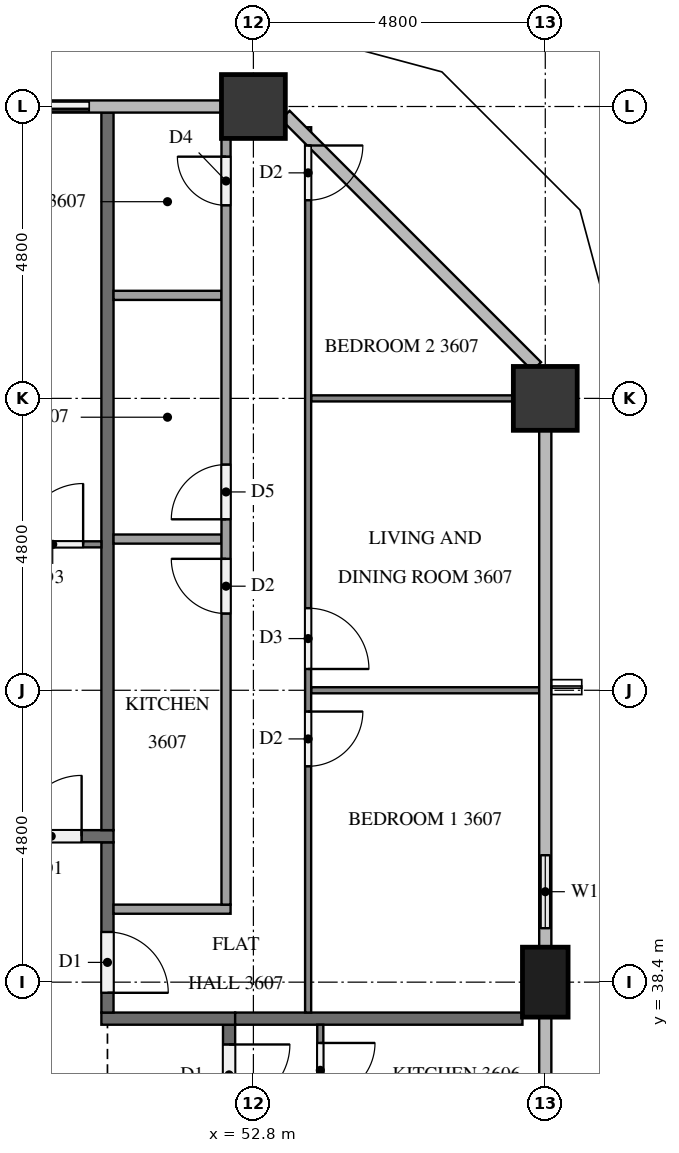
"""IFC4 building model, lengths in metres.
Left out: names, types, materials, properties, quantities, classifications, styles, units other than length and angle.
Written with IfcOpenShell. Run it as: python <this file> out.ifc"""

import sys

from ifc_helpers import new_model, si_unit, direction, frame, frame_2d, origin, origin_2d, place, context, subcontext, project, spatial, rectangle, extrude, element, fill, save


model = new_model("IFC4")
c1 = context("Model", 3, precision=1e-05, world=origin(), true_north=direction((0.0, 1.0)))
c2 = subcontext(c1, "Body", "Model", "MODEL_VIEW")
j1 = project(units=[si_unit("LENGTHUNIT", "METRE"), si_unit("PLANEANGLEUNIT", "RADIAN")], contexts=[c1])
p1 = place(None, origin())
s1 = spatial("IfcSite", under=j1, at=p1, CompositionType="ELEMENT")
p2 = place(p1, origin())
s2 = spatial("IfcBuilding", under=s1, at=p2, CompositionType="ELEMENT")
p3 = place(p2, frame((0.0, 0.0, 140.1)))
s3 = spatial("IfcBuildingStorey", under=s2, at=p3, CompositionType="ELEMENT", Elevation=140.1)
p4 = place(p3, frame((57.6, 38.4, 0.0), z_axis=(0.0, 0.0, 1.0), x_axis=(0.0, 1.0, 0.0)))
e1 = element("IfcColumn", 1, at=p4, inside=s3, PredefinedType="COLUMN", context=c2, shape_type="SweptSolid", body=[
    extrude(rectangle(XDim=1.15, YDim=0.75, at=origin_2d()), origin(), (0.0, 0.0, 1.0), 3.1),
])
for number, where, z_axis, x_axis in (
    (2, (57.6, 48.0, 0.0), (0.0, 0.0, 1.0), (1.0, 0.0, 0.0)),
    (3, (52.8, 52.8, 0.0), (0.0, 0.0, 1.0), (1.0, 0.0, 0.0)),
):
    element("IfcColumn", number, at=place(p3, frame(where, z_axis=z_axis, x_axis=x_axis)), inside=s3, PredefinedType="COLUMN", context=c2, shape_type="SweptSolid", body=[
        extrude(rectangle(XDim=1.05, YDim=1.05, at=origin_2d()), origin(), (0.0, 0.0, 1.0), 3.1),
    ])
p5 = place(p3, frame((57.6, 38.975, 0.0), z_axis=(0.0, 0.0, 1.0), x_axis=(0.0, 1.0, 0.0)))
e4 = element("IfcWall", 4, at=p5, inside=s3, PredefinedType="SOLIDWALL", context=c2, shape_type="SweptSolid", body=[
    extrude(rectangle(XDim=1.825, YDim=0.15, at=frame_2d((0.913, 0.0))), origin(), (0.0, 0.0, 1.0), 3.1),
])
p6 = place(p5, frame((0.312, 0.0, 0.9)))
e5 = element("IfcOpeningElement", 5, at=p6, cuts=e4, PredefinedType="OPENING", context=c2, shape_type="SweptSolid", body=[
    extrude(rectangle(XDim=1.2, YDim=1.4, at=frame_2d((0.6, 0.7))), frame((0.0, 0.085, 0.0), z_axis=(0.0, -1.0, 0.0), x_axis=(1.0, 0.0, 0.0)), (0.0, 0.0, 1.0), 0.17),
])
p7 = place(p3, frame((50.4, 52.8, 0.0), z_axis=(0.0, 0.0, 1.0), x_axis=(-1.0, 0.0, 0.0)))
e6 = element("IfcWall", 6, at=p7, inside=s3, PredefinedType="SOLIDWALL", context=c2, shape_type="SweptSolid", body=[
    extrude(rectangle(XDim=2.4, YDim=0.15, at=frame_2d((1.2, 0.0))), origin(), (0.0, 0.0, 1.0), 3.1),
])
p8 = place(p7, frame((0.3, 0.0, 0.0)))
e7 = element("IfcOpeningElement", 7, at=p8, cuts=e6, PredefinedType="OPENING", context=c2, shape_type="SweptSolid", body=[
    extrude(rectangle(XDim=1.8, YDim=2.4, at=frame_2d((0.9, 1.2))), frame((0.0, 0.085, 0.0), z_axis=(0.0, -1.0, 0.0), x_axis=(1.0, 0.0, 0.0)), (0.0, 0.0, 1.0), 0.17),
])
p9 = place(p3, frame((52.4, 37.7, 0.0), z_axis=(0.0, 0.0, 1.0), x_axis=(0.0, -1.0, 0.0)))
e8 = element("IfcWall", 8, at=p9, inside=s3, PredefinedType="PARTITIONING", context=c2, shape_type="SweptSolid", body=[
    extrude(rectangle(XDim=22.6, YDim=0.2, at=frame_2d((11.3, 0.0))), origin(), (0.0, 0.0, 1.0), 3.1),
])
p10 = place(p9, frame((14.125, 0.0, 0.0)))
e9 = element("IfcOpeningElement", 9, at=p10, cuts=e8, PredefinedType="OPENING", context=c2, shape_type="SweptSolid", body=[
    extrude(rectangle(XDim=1.0, YDim=2.1, at=frame_2d((0.5, 1.05))), frame((0.0, 0.11, 0.0), z_axis=(0.0, -1.0, 0.0), x_axis=(1.0, 0.0, 0.0)), (0.0, 0.0, 1.0), 0.22),
])
p11 = place(p9, frame((0.325, 0.0, 0.0)))
e10 = element("IfcOpeningElement", 10, at=p11, cuts=e8, PredefinedType="OPENING", context=c2, shape_type="SweptSolid", body=[
    extrude(rectangle(XDim=1.0, YDim=2.1, at=frame_2d((0.5, 1.05))), frame((0.0, 0.11, 0.0), z_axis=(0.0, -1.0, 0.0), x_axis=(1.0, 0.0, 0.0)), (0.0, 0.0, 1.0), 0.22),
])
p12 = place(p3, frame((52.5, 37.8, 0.0), z_axis=(0.0, 0.0, 1.0), x_axis=(-1.0, 0.0, 0.0)))
e11 = element("IfcWall", 11, at=p12, inside=s3, PredefinedType="PARTITIONING", context=c2, shape_type="SweptSolid", body=[
    extrude(rectangle(XDim=2.2, YDim=0.2, at=frame_2d((1.1, 0.0))), origin(), (0.0, 0.0, 1.0), 3.1),
])
p13 = place(p3, frame((50.4, 40.7, 0.0), z_axis=(0.0, 0.0, 1.0), x_axis=(0.0, -1.0, 0.0)))
e12 = element("IfcWall", 12, at=p13, inside=s3, PredefinedType="PARTITIONING", context=c2, shape_type="SweptSolid", body=[
    extrude(rectangle(XDim=2.8, YDim=0.2, at=frame_2d((1.4, 0.0))), origin(), (0.0, 0.0, 1.0), 3.1),
])
p14 = place(p13, frame((1.475, 0.0, 0.0)))
e13 = element("IfcOpeningElement", 13, at=p14, cuts=e12, PredefinedType="OPENING", context=c2, shape_type="SweptSolid", body=[
    extrude(rectangle(XDim=1.0, YDim=2.1, at=frame_2d((0.5, 1.05))), frame((0.0, 0.11, 0.0), z_axis=(0.0, -1.0, 0.0), x_axis=(1.0, 0.0, 0.0)), (0.0, 0.0, 1.0), 0.22),
])
p15 = place(p3, frame((11.9, 40.8, 0.0), z_axis=(0.0, 0.0, 1.0), x_axis=(1.0, 0.0, 0.0)))
e14 = element("IfcWall", 14, at=p15, inside=s3, PredefinedType="PARTITIONING", context=c2, shape_type="SweptSolid", body=[
    extrude(rectangle(XDim=38.6, YDim=0.2, at=frame_2d((19.3, 0.0))), origin(), (0.0, 0.0, 1.0), 3.1),
])
p16 = place(p15, frame((37.075, 0.0, 0.0)))
e15 = element("IfcOpeningElement", 15, at=p16, cuts=e14, PredefinedType="OPENING", context=c2, shape_type="SweptSolid", body=[
    extrude(rectangle(XDim=1.0, YDim=2.1, at=frame_2d((0.5, 1.05))), frame((0.0, 0.11, 0.0), z_axis=(0.0, -1.0, 0.0), x_axis=(1.0, 0.0, 0.0)), (0.0, 0.0, 1.0), 0.22),
])
p17 = place(p15, frame((25.075, 0.0, 0.0)))
e16 = element("IfcOpeningElement", 16, at=p17, cuts=e14, PredefinedType="OPENING", context=c2, shape_type="SweptSolid", body=[
    extrude(rectangle(XDim=1.0, YDim=2.1, at=frame_2d((0.5, 1.05))), frame((0.0, 0.11, 0.0), z_axis=(0.0, -1.0, 0.0), x_axis=(1.0, 0.0, 0.0)), (0.0, 0.0, 1.0), 0.22),
])
p18 = place(p15, frame((0.475, 0.0, 0.0)))
e17 = element("IfcOpeningElement", 17, at=p18, cuts=e14, PredefinedType="OPENING", context=c2, shape_type="SweptSolid", body=[
    extrude(rectangle(XDim=1.1, YDim=2.1, at=frame_2d((0.55, 1.05))), frame((0.0, 0.11, 0.0), z_axis=(0.0, -1.0, 0.0), x_axis=(1.0, 0.0, 0.0)), (0.0, 0.0, 1.0), 0.22),
])
p19 = place(p3, frame((52.5, 37.8, 0.0), z_axis=(0.0, 0.0, 1.0), x_axis=(1.0, 0.0, 0.0)))
e18 = element("IfcWall", 18, at=p19, inside=s3, PredefinedType="PARTITIONING", context=c2, shape_type="SweptSolid", body=[
    extrude(rectangle(XDim=4.725, YDim=0.2, at=frame_2d((2.363, 0.0))), origin(), (0.0, 0.0, 1.0), 3.1),
])
p20 = place(p3, frame((50.4, 40.9, 0.0), z_axis=(0.0, 0.0, 1.0), x_axis=(0.0, 1.0, 0.0)))
e19 = element("IfcWall", 19, at=p20, inside=s3, PredefinedType="PARTITIONING", context=c2, shape_type="SweptSolid", body=[
    extrude(rectangle(XDim=11.8, YDim=0.2, at=frame_2d((5.9, 0.0))), origin(), (0.0, 0.0, 1.0), 3.1),
])
p21 = place(p3, frame((53.9, 37.7, 0.0), z_axis=(0.0, 0.0, 1.0), x_axis=(0.0, -1.0, 0.0)))
e20 = element("IfcWall", 20, at=p21, inside=s3, PredefinedType="PARTITIONING", context=c2, shape_type="SweptSolid", body=[
    extrude(rectangle(XDim=13.6, YDim=0.1, at=frame_2d((6.8, 0.0))), origin(), (0.0, 0.0, 1.0), 3.1),
])
p22 = place(p21, frame((0.3, 0.0, 0.0)))
e21 = element("IfcOpeningElement", 21, at=p22, cuts=e20, PredefinedType="OPENING", context=c2, shape_type="SweptSolid", body=[
    extrude(rectangle(XDim=0.9, YDim=2.1, at=frame_2d((0.45, 1.05))), frame((0.0, 0.06, 0.0), z_axis=(0.0, -1.0, 0.0), x_axis=(1.0, 0.0, 0.0)), (0.0, 0.0, 1.0), 0.12),
])
p23 = place(p21, frame((2.95, 0.0, 0.0)))
e22 = element("IfcOpeningElement", 22, at=p23, cuts=e20, PredefinedType="OPENING", context=c2, shape_type="SweptSolid", body=[
    extrude(rectangle(XDim=0.8, YDim=2.1, at=frame_2d((0.4, 1.05))), frame((0.0, 0.06, 0.0), z_axis=(0.0, -1.0, 0.0), x_axis=(1.0, 0.0, 0.0)), (0.0, 0.0, 1.0), 0.12),
])
p24 = place(p21, frame((4.45, 0.0, 0.0)))
e23 = element("IfcOpeningElement", 23, at=p24, cuts=e20, PredefinedType="OPENING", context=c2, shape_type="SweptSolid", body=[
    extrude(rectangle(XDim=0.9, YDim=2.1, at=frame_2d((0.45, 1.05))), frame((0.0, 0.06, 0.0), z_axis=(0.0, -1.0, 0.0), x_axis=(1.0, 0.0, 0.0)), (0.0, 0.0, 1.0), 0.12),
])
p25 = place(p21, frame((12.3, 0.0, 0.0)))
e24 = element("IfcOpeningElement", 24, at=p25, cuts=e20, PredefinedType="OPENING", context=c2, shape_type="SweptSolid", body=[
    extrude(rectangle(XDim=1.0, YDim=2.1, at=frame_2d((0.5, 1.05))), frame((0.0, 0.06, 0.0), z_axis=(0.0, -1.0, 0.0), x_axis=(1.0, 0.0, 0.0)), (0.0, 0.0, 1.0), 0.12),
])
p26 = place(p3, frame((53.75, 43.2, 0.0), z_axis=(0.0, 0.0, 1.0), x_axis=(1.0, 0.0, 0.0)))
e25 = element("IfcWall", 25, at=p26, inside=s3, PredefinedType="PARTITIONING", context=c2, shape_type="SweptSolid", body=[
    extrude(rectangle(XDim=3.75, YDim=0.1, at=frame_2d((1.875, 0.0))), origin(), (0.0, 0.0, 1.0), 3.1),
])
p27 = place(p3, frame((53.75, 48.0, 0.0), z_axis=(0.0, 0.0, 1.0), x_axis=(1.0, 0.0, 0.0)))
e26 = element("IfcWall", 26, at=p27, inside=s3, PredefinedType="PARTITIONING", context=c2, shape_type="SweptSolid", body=[
    extrude(rectangle(XDim=3.325, YDim=0.1, at=frame_2d((1.663, 0.0))), origin(), (0.0, 0.0, 1.0), 3.1),
])
p28 = place(p3, frame((53.7, 52.459, 0.0), z_axis=(0.0, 0.0, 1.0), x_axis=(0.0, -1.0, 0.0)))
e27 = element("IfcWall", 27, at=p28, inside=s3, PredefinedType="PARTITIONING", context=c2, shape_type="SweptSolid", body=[
    extrude(rectangle(XDim=14.559, YDim=0.1, at=frame_2d((7.279, 0.0))), origin(), (0.0, 0.0, 1.0), 3.1),
])
p29 = place(p28, frame((9.609, 0.0, 0.0)))
e28 = element("IfcOpeningElement", 28, at=p29, cuts=e27, PredefinedType="OPENING", context=c2, shape_type="SweptSolid", body=[
    extrude(rectangle(XDim=0.9, YDim=2.1, at=frame_2d((0.45, 1.05))), frame((0.0, 0.06, 0.0), z_axis=(0.0, -1.0, 0.0), x_axis=(1.0, 0.0, 0.0)), (0.0, 0.0, 1.0), 0.12),
])
p30 = place(p28, frame((7.909, 0.0, 0.0)))
e29 = element("IfcOpeningElement", 29, at=p30, cuts=e27, PredefinedType="OPENING", context=c2, shape_type="SweptSolid", body=[
    extrude(rectangle(XDim=1.0, YDim=2.1, at=frame_2d((0.5, 1.05))), frame((0.0, 0.06, 0.0), z_axis=(0.0, -1.0, 0.0), x_axis=(1.0, 0.0, 0.0)), (0.0, 0.0, 1.0), 0.12),
])
p31 = place(p28, frame((0.3, 0.0, 0.0)))
e30 = element("IfcOpeningElement", 30, at=p31, cuts=e27, PredefinedType="OPENING", context=c2, shape_type="SweptSolid", body=[
    extrude(rectangle(XDim=0.9, YDim=2.1, at=frame_2d((0.45, 1.05))), frame((0.0, 0.06, 0.0), z_axis=(0.0, -1.0, 0.0), x_axis=(1.0, 0.0, 0.0)), (0.0, 0.0, 1.0), 0.12),
])
for number, where, z_axis, x_axis in (
    (31, (50.5, 45.687, 0.0), (0.0, 0.0, 1.0), (1.0, 0.0, 0.0)),
    (32, (50.5, 49.694, 0.0), (0.0, 0.0, 1.0), (1.0, 0.0, 0.0)),
):
    element("IfcWall", number, at=place(p3, frame(where, z_axis=z_axis, x_axis=x_axis)), inside=s3, PredefinedType="PARTITIONING", context=c2, shape_type="SweptSolid", body=[
        extrude(rectangle(XDim=1.775, YDim=0.15, at=frame_2d((0.887, 0.0))), origin(), (0.0, 0.0, 1.0), 3.1),
    ])
p32 = place(p3, frame((50.5, 39.6, 0.0), z_axis=(0.0, 0.0, 1.0), x_axis=(1.0, 0.0, 0.0)))
e33 = element("IfcWall", 33, at=p32, inside=s3, PredefinedType="PARTITIONING", context=c2, shape_type="SweptSolid", body=[
    extrude(rectangle(XDim=1.925, YDim=0.15, at=frame_2d((0.962, 0.0))), origin(), (0.0, 0.0, 1.0), 3.1),
])
p33 = place(p3, frame((52.35, 39.675, 0.0), z_axis=(0.0, 0.0, 1.0), x_axis=(0.0, 1.0, 0.0)))
e34 = element("IfcWall", 34, at=p33, inside=s3, PredefinedType="PARTITIONING", context=c2, shape_type="SweptSolid", body=[
    extrude(rectangle(XDim=12.6, YDim=0.15, at=frame_2d((6.3, 0.0))), origin(), (0.0, 0.0, 1.0), 3.1),
])
p34 = place(p33, frame((4.787, 0.0, 0.0)))
e35 = element("IfcOpeningElement", 35, at=p34, cuts=e34, PredefinedType="OPENING", context=c2, shape_type="SweptSolid", body=[
    extrude(rectangle(XDim=0.9, YDim=2.1, at=frame_2d((0.45, 1.05))), frame((0.0, 0.085, 0.0), z_axis=(0.0, -1.0, 0.0), x_axis=(1.0, 0.0, 0.0)), (0.0, 0.0, 1.0), 0.17),
])
p35 = place(p33, frame((6.336, 0.0, 0.0)))
e36 = element("IfcOpeningElement", 36, at=p35, cuts=e34, PredefinedType="OPENING", context=c2, shape_type="SweptSolid", body=[
    extrude(rectangle(XDim=0.9, YDim=2.1, at=frame_2d((0.45, 1.05))), frame((0.0, 0.085, 0.0), z_axis=(0.0, -1.0, 0.0), x_axis=(1.0, 0.0, 0.0)), (0.0, 0.0, 1.0), 0.17),
])
p36 = place(p33, frame((11.5, 0.0, 0.0)))
e37 = element("IfcOpeningElement", 37, at=p36, cuts=e34, PredefinedType="OPENING", context=c2, shape_type="SweptSolid", body=[
    extrude(rectangle(XDim=0.8, YDim=2.1, at=frame_2d((0.4, 1.05))), frame((0.0, 0.085, 0.0), z_axis=(0.0, -1.0, 0.0), x_axis=(1.0, 0.0, 0.0)), (0.0, 0.0, 1.0), 0.17),
])
p37 = place(p3, frame((38.5, 45.6, 0.0), z_axis=(0.0, 0.0, 1.0), x_axis=(1.0, 0.0, 0.0)))
e38 = element("IfcWall", 38, at=p37, inside=s3, PredefinedType="PARTITIONING", context=c2, shape_type="SweptSolid", body=[
    extrude(rectangle(XDim=11.8, YDim=0.1, at=frame_2d((5.9, 0.0))), origin(), (0.0, 0.0, 1.0), 3.1),
])
p38 = place(p37, frame((10.5, 0.0, 0.0)))
e39 = element("IfcOpeningElement", 39, at=p38, cuts=e38, PredefinedType="OPENING", context=c2, shape_type="SweptSolid", body=[
    extrude(rectangle(XDim=1.0, YDim=2.1, at=frame_2d((0.5, 1.05))), frame((0.0, 0.06, 0.0), z_axis=(0.0, -1.0, 0.0), x_axis=(1.0, 0.0, 0.0)), (0.0, 0.0, 1.0), 0.12),
])
p39 = place(p37, frame((0.3, 0.0, 0.0)))
e40 = element("IfcOpeningElement", 40, at=p39, cuts=e38, PredefinedType="OPENING", context=c2, shape_type="SweptSolid", body=[
    extrude(rectangle(XDim=0.9, YDim=2.1, at=frame_2d((0.45, 1.05))), frame((0.0, 0.06, 0.0), z_axis=(0.0, -1.0, 0.0), x_axis=(1.0, 0.0, 0.0)), (0.0, 0.0, 1.0), 0.12),
])
p40 = place(p6, origin())
e41 = element("IfcWindow", 41, at=p40, inside=s3, PartitioningType="SINGLE_PANEL", PredefinedType="WINDOW", context=c2, shape_type="SweptSolid", body=[
    extrude(rectangle(XDim=1.2, YDim=1.4, at=frame_2d((0.6, 0.7))), frame((0.0, 0.03, 0.0), z_axis=(0.0, -1.0, 0.0), x_axis=(1.0, 0.0, 0.0)), (0.0, 0.0, 1.0), 0.06),
])
fill(e5, e41)
p41 = place(p8, origin())
e42 = element("IfcDoor", 42, at=p41, inside=s3, OperationType="SLIDING_TO_RIGHT", PredefinedType="DOOR", context=c2, shape_type="SweptSolid", body=[
    extrude(rectangle(XDim=1.8, YDim=2.4, at=frame_2d((0.9, 1.2))), frame((0.0, 0.025, 0.0), z_axis=(0.0, -1.0, 0.0), x_axis=(1.0, 0.0, 0.0)), (0.0, 0.0, 1.0), 0.05),
])
fill(e7, e42)
p42 = place(p11, origin())
e43 = element("IfcDoor", 43, at=p42, inside=s3, OperationType="SINGLE_SWING_LEFT", PredefinedType="DOOR", context=c2, shape_type="SweptSolid", body=[
    extrude(rectangle(XDim=1.0, YDim=2.1, at=frame_2d((0.5, 1.05))), frame((0.0, 0.025, 0.0), z_axis=(0.0, -1.0, 0.0), x_axis=(1.0, 0.0, 0.0)), (0.0, 0.0, 1.0), 0.05),
])
fill(e10, e43)
p43 = place(p14, origin())
e44 = element("IfcDoor", 44, at=p43, inside=s3, OperationType="SINGLE_SWING_RIGHT", PredefinedType="DOOR", context=c2, shape_type="SweptSolid", body=[
    extrude(rectangle(XDim=1.0, YDim=2.1, at=frame_2d((0.5, 1.05))), frame((0.0, 0.025, 0.0), z_axis=(0.0, -1.0, 0.0), x_axis=(1.0, 0.0, 0.0)), (0.0, 0.0, 1.0), 0.05),
])
fill(e13, e44)
p44 = place(p16, origin())
e45 = element("IfcDoor", 45, at=p44, inside=s3, OperationType="SINGLE_SWING_RIGHT", PredefinedType="DOOR", context=c2, shape_type="SweptSolid", body=[
    extrude(rectangle(XDim=1.0, YDim=2.1, at=frame_2d((0.5, 1.05))), frame((0.0, 0.025, 0.0), z_axis=(0.0, -1.0, 0.0), x_axis=(1.0, 0.0, 0.0)), (0.0, 0.0, 1.0), 0.05),
])
fill(e15, e45)
p45 = place(p22, origin())
e46 = element("IfcDoor", 46, at=p45, inside=s3, OperationType="SINGLE_SWING_LEFT", PredefinedType="DOOR", context=c2, shape_type="SweptSolid", body=[
    extrude(rectangle(XDim=0.9, YDim=2.1, at=frame_2d((0.45, 1.05))), frame((0.0, 0.025, 0.0), z_axis=(0.0, -1.0, 0.0), x_axis=(1.0, 0.0, 0.0)), (0.0, 0.0, 1.0), 0.05),
])
fill(e21, e46)
p46 = place(p29, origin())
e47 = element("IfcDoor", 47, at=p46, inside=s3, OperationType="SINGLE_SWING_LEFT", PredefinedType="DOOR", context=c2, shape_type="SweptSolid", body=[
    extrude(rectangle(XDim=0.9, YDim=2.1, at=frame_2d((0.45, 1.05))), frame((0.0, 0.025, 0.0), z_axis=(0.0, -1.0, 0.0), x_axis=(1.0, 0.0, 0.0)), (0.0, 0.0, 1.0), 0.05),
])
fill(e28, e47)
p47 = place(p30, origin())
e48 = element("IfcDoor", 48, at=p47, inside=s3, OperationType="SINGLE_SWING_RIGHT", PredefinedType="DOOR", context=c2, shape_type="SweptSolid", body=[
    extrude(rectangle(XDim=1.0, YDim=2.1, at=frame_2d((0.5, 1.05))), frame((0.0, 0.025, 0.0), z_axis=(0.0, -1.0, 0.0), x_axis=(1.0, 0.0, 0.0)), (0.0, 0.0, 1.0), 0.05),
])
fill(e29, e48)
p48 = place(p31, origin())
e49 = element("IfcDoor", 49, at=p48, inside=s3, OperationType="SINGLE_SWING_LEFT", PredefinedType="DOOR", context=c2, shape_type="SweptSolid", body=[
    extrude(rectangle(XDim=0.9, YDim=2.1, at=frame_2d((0.45, 1.05))), frame((0.0, 0.025, 0.0), z_axis=(0.0, -1.0, 0.0), x_axis=(1.0, 0.0, 0.0)), (0.0, 0.0, 1.0), 0.05),
])
fill(e30, e49)
p49 = place(p34, origin())
e50 = element("IfcDoor", 50, at=p49, inside=s3, OperationType="SINGLE_SWING_RIGHT", PredefinedType="DOOR", context=c2, shape_type="SweptSolid", body=[
    extrude(rectangle(XDim=0.9, YDim=2.1, at=frame_2d((0.45, 1.05))), frame((0.0, 0.025, 0.0), z_axis=(0.0, -1.0, 0.0), x_axis=(1.0, 0.0, 0.0)), (0.0, 0.0, 1.0), 0.05),
])
fill(e35, e50)
p50 = place(p35, origin())
e51 = element("IfcDoor", 51, at=p50, inside=s3, OperationType="SINGLE_SWING_LEFT", PredefinedType="DOOR", context=c2, shape_type="SweptSolid", body=[
    extrude(rectangle(XDim=0.9, YDim=2.1, at=frame_2d((0.45, 1.05))), frame((0.0, 0.025, 0.0), z_axis=(0.0, -1.0, 0.0), x_axis=(1.0, 0.0, 0.0)), (0.0, 0.0, 1.0), 0.05),
])
fill(e36, e51)
p51 = place(p36, origin())
e52 = element("IfcDoor", 52, at=p51, inside=s3, OperationType="SINGLE_SWING_RIGHT", PredefinedType="DOOR", context=c2, shape_type="SweptSolid", body=[
    extrude(rectangle(XDim=0.8, YDim=2.1, at=frame_2d((0.4, 1.05))), frame((0.0, 0.025, 0.0), z_axis=(0.0, -1.0, 0.0), x_axis=(1.0, 0.0, 0.0)), (0.0, 0.0, 1.0), 0.05),
])
fill(e37, e52)
p52 = place(p38, origin())
e53 = element("IfcDoor", 53, at=p52, inside=s3, OperationType="SINGLE_SWING_RIGHT", PredefinedType="DOOR", context=c2, shape_type="SweptSolid", body=[
    extrude(rectangle(XDim=1.0, YDim=2.1, at=frame_2d((0.5, 1.05))), frame((0.0, 0.025, 0.0), z_axis=(0.0, -1.0, 0.0), x_axis=(1.0, 0.0, 0.0)), (0.0, 0.0, 1.0), 0.05),
])
fill(e39, e53)
save(model, sys.argv[1])
